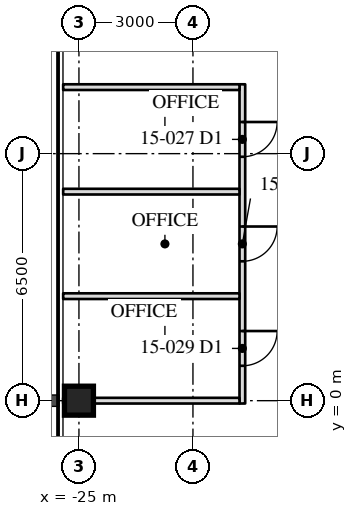
"""IFC4 building model, lengths in metres.
Left out: names, types, materials, properties, quantities, classifications, styles, units other than length and angle.
Written with IfcOpenShell. Run it as: python <this file> out.ifc"""

import sys

from ifc_helpers import new_model, si_unit, direction, frame, frame_2d, origin, origin_2d, place, context, subcontext, project, spatial, rectangle, hollow_rectangle, extrude, element, fill, save


model = new_model("IFC4")
c1 = context("Model", 3, precision=1e-05, world=origin(), true_north=direction((0.0, 1.0)))
c2 = subcontext(c1, "Body", "Model", "MODEL_VIEW")
j1 = project(units=[si_unit("LENGTHUNIT", "METRE"), si_unit("PLANEANGLEUNIT", "RADIAN")], contexts=[c1])
p1 = place(None, origin())
s1 = spatial("IfcSite", under=j1, at=p1, CompositionType="ELEMENT")
p2 = place(p1, origin())
s2 = spatial("IfcBuilding", under=s1, at=p2, CompositionType="ELEMENT")
p3 = place(p2, frame((0.0, 0.0, 65.2)))
s3 = spatial("IfcBuildingStorey", under=s2, at=p3, CompositionType="ELEMENT", Elevation=65.2)
p4 = place(p3, frame((-25.0, 0.0, 0.0), z_axis=(0.0, 0.0, 1.0), x_axis=(0.0, 1.0, 0.0)))
e1 = element("IfcColumn", 1, at=p4, inside=s3, PredefinedType="COLUMN", context=c2, shape_type="SweptSolid", body=[
    extrude(hollow_rectangle(XDim=0.762, YDim=0.762, WallThickness=0.127, at=origin_2d()), origin(), (0.0, 0.0, 1.0), 4.1),
])
p5 = place(p3, frame((-20.7, 8.325, 0.0), z_axis=(0.0, 0.0, 1.0), x_axis=(0.0, -1.0, 0.0)))
e2 = element("IfcWall", 2, at=p5, inside=s3, PredefinedType="PARTITIONING", context=c2, shape_type="SweptSolid", body=[
    extrude(rectangle(XDim=8.4, YDim=0.15, at=frame_2d((4.2, 0.0))), origin(), (0.0, 0.0, 1.0), 3.91),
])
p6 = place(p5, frame((0.992, 0.0, 0.0)))
e3 = element("IfcOpeningElement", 3, at=p6, cuts=e2, PredefinedType="OPENING", context=c2, shape_type="SweptSolid", body=[
    extrude(rectangle(XDim=0.915, YDim=2.134, at=frame_2d((0.458, 1.067))), frame((0.0, 0.085, 0.0), z_axis=(0.0, -1.0, 0.0), x_axis=(1.0, 0.0, 0.0)), (0.0, 0.0, 1.0), 0.17),
])
p7 = place(p5, frame((3.742, 0.0, 0.0)))
e4 = element("IfcOpeningElement", 4, at=p7, cuts=e2, PredefinedType="OPENING", context=c2, shape_type="SweptSolid", body=[
    extrude(rectangle(XDim=0.915, YDim=2.134, at=frame_2d((0.458, 1.067))), frame((0.0, 0.085, 0.0), z_axis=(0.0, -1.0, 0.0), x_axis=(1.0, 0.0, 0.0)), (0.0, 0.0, 1.0), 0.17),
])
p8 = place(p5, frame((6.492, 0.0, 0.0)))
e5 = element("IfcOpeningElement", 5, at=p8, cuts=e2, PredefinedType="OPENING", context=c2, shape_type="SweptSolid", body=[
    extrude(rectangle(XDim=0.915, YDim=2.134, at=frame_2d((0.458, 1.067))), frame((0.0, 0.085, 0.0), z_axis=(0.0, -1.0, 0.0), x_axis=(1.0, 0.0, 0.0)), (0.0, 0.0, 1.0), 0.17),
])
for number, where, z_axis, x_axis in (
    (6, (-20.775, 8.25, 0.0), (0.0, 0.0, 1.0), (-1.0, 0.0, 0.0)),
    (7, (-20.775, 5.5, 0.0), (0.0, 0.0, 1.0), (-1.0, 0.0, 0.0)),
    (8, (-20.775, 2.75, 0.0), (0.0, 0.0, 1.0), (-1.0, 0.0, 0.0)),
):
    element("IfcWall", number, at=place(p3, frame(where, z_axis=z_axis, x_axis=x_axis)), inside=s3, PredefinedType="PARTITIONING", context=c2, shape_type="SweptSolid", body=[
        extrude(rectangle(XDim=4.64, YDim=0.15, at=frame_2d((2.32, 0.0))), origin(), (0.0, 0.0, 1.0), 3.91),
    ])
p9 = place(p3, frame((-20.775, 0.0, 0.0), z_axis=(0.0, 0.0, 1.0), x_axis=(-1.0, 0.0, 0.0)))
e9 = element("IfcWall", 9, at=p9, inside=s3, PredefinedType="PARTITIONING", context=c2, shape_type="SweptSolid", body=[
    extrude(rectangle(XDim=4.64, YDim=0.15, at=frame_2d((2.32, 0.0))), origin(), (0.0, 0.0, 1.0), 3.13),
])
p10 = place(p6, origin())
e10 = element("IfcDoor", 10, at=p10, inside=s3, OperationType="SINGLE_SWING_LEFT", PredefinedType="DOOR", context=c2, shape_type="SweptSolid", body=[
    extrude(rectangle(XDim=0.915, YDim=2.134, at=frame_2d((0.458, 1.067))), frame((0.0, 0.025, 0.0), z_axis=(0.0, -1.0, 0.0), x_axis=(1.0, 0.0, 0.0)), (0.0, 0.0, 1.0), 0.05),
])
fill(e3, e10)
p11 = place(p7, origin())
e11 = element("IfcDoor", 11, at=p11, inside=s3, OperationType="SINGLE_SWING_LEFT", PredefinedType="DOOR", context=c2, shape_type="SweptSolid", body=[
    extrude(rectangle(XDim=0.915, YDim=2.134, at=frame_2d((0.458, 1.067))), frame((0.0, 0.025, 0.0), z_axis=(0.0, -1.0, 0.0), x_axis=(1.0, 0.0, 0.0)), (0.0, 0.0, 1.0), 0.05),
])
fill(e4, e11)
p12 = place(p8, origin())
e12 = element("IfcDoor", 12, at=p12, inside=s3, OperationType="SINGLE_SWING_LEFT", PredefinedType="DOOR", context=c2, shape_type="SweptSolid", body=[
    extrude(rectangle(XDim=0.915, YDim=2.134, at=frame_2d((0.458, 1.067))), frame((0.0, 0.025, 0.0), z_axis=(0.0, -1.0, 0.0), x_axis=(1.0, 0.0, 0.0)), (0.0, 0.0, 1.0), 0.05),
])
fill(e5, e12)
save(model, sys.argv[1])
